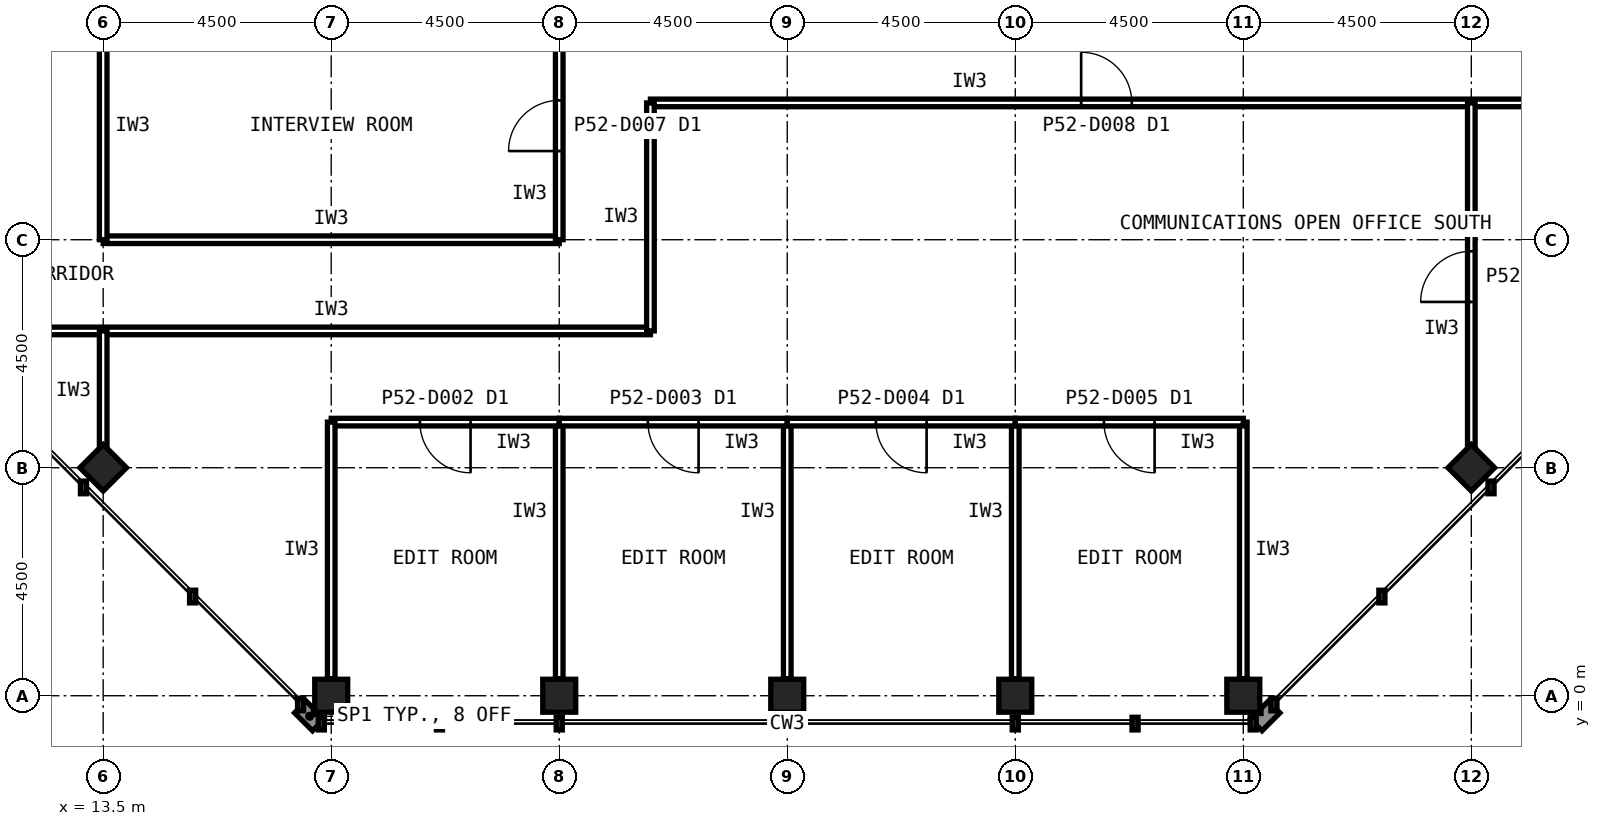
"""IFC4 building model, lengths in metres.
Left out: names, types, materials, properties, quantities, classifications, styles, units other than length and angle.
Written with IfcOpenShell. Run it as: python <this file> out.ifc"""

import sys

from ifc_helpers import new_model, si_unit, direction, frame, frame_2d, origin, origin_2d, place, context, subcontext, project, spatial, rectangle, hollow_rectangle, extrude, element, fill, save


model = new_model("IFC4")
c1 = context("Model", 3, precision=1e-05, world=origin(), true_north=direction((0.0, 1.0)))
c2 = subcontext(c1, "Body", "Model", "MODEL_VIEW")
j1 = project(units=[si_unit("LENGTHUNIT", "METRE"), si_unit("PLANEANGLEUNIT", "RADIAN")], contexts=[c1])
p1 = place(None, origin())
s1 = spatial("IfcSite", under=j1, at=p1, CompositionType="ELEMENT")
p2 = place(p1, origin())
s2 = spatial("IfcBuilding", under=s1, at=p2, CompositionType="ELEMENT")
p3 = place(p2, frame((0.0, 0.0, 222.6)))
s3 = spatial("IfcBuildingStorey", under=s2, at=p3, CompositionType="ELEMENT", Elevation=222.6)
for number, where, z_axis, x_axis in (
    (1, (18.0, 0.0, 0.0), (0.0, 0.0, 1.0), (1.0, 0.0, 0.0)),
    (2, (22.5, 0.0, 0.0), (0.0, 0.0, 1.0), (1.0, 0.0, 0.0)),
    (3, (27.0, 0.0, 0.0), (0.0, 0.0, 1.0), (1.0, 0.0, 0.0)),
    (4, (31.5, 0.0, 0.0), (0.0, 0.0, 1.0), (1.0, 0.0, 0.0)),
    (5, (36.0, 0.0, 0.0), (0.0, 0.0, 1.0), (1.0, 0.0, 0.0)),
    (6, (13.5, 4.5, 0.0), (0.0, 0.0, 1.0), (0.707, 0.707, 0.0)),
    (7, (40.5, 4.5, 0.0), (0.0, 0.0, 1.0), (0.707, 0.707, 0.0)),
):
    element("IfcColumn", number, at=place(p3, frame(where, z_axis=z_axis, x_axis=x_axis)), inside=s3, PredefinedType="COLUMN", context=c2, shape_type="SweptSolid", body=[
        extrude(hollow_rectangle(XDim=0.65, YDim=0.65, WallThickness=0.032, at=origin_2d()), origin(), (0.0, 0.0, 1.0), 4.0),
    ])
p4 = place(p3, frame((24.3, 11.7, 0.0), z_axis=(0.0, 0.0, 1.0), x_axis=(1.0, 0.0, 0.0)))
e8 = element("IfcWall", 8, at=p4, inside=s3, PredefinedType="PARTITIONING", context=c2, shape_type="SweptSolid", body=[
    extrude(rectangle(XDim=18.0, YDim=0.15, at=frame_2d((9.0, 0.0))), origin(), (0.0, 0.0, 1.0), 3.84),
])
p5 = place(p4, frame((8.5, 0.0, 0.0)))
e9 = element("IfcOpeningElement", 9, at=p5, cuts=e8, PredefinedType="OPENING", context=c2, shape_type="SweptSolid", body=[
    extrude(rectangle(XDim=1.0, YDim=2.1, at=frame_2d((0.5, 1.05))), frame((0.0, 0.085, 0.0), z_axis=(0.0, -1.0, 0.0), x_axis=(1.0, 0.0, 0.0)), (0.0, 0.0, 1.0), 0.17),
])
p6 = place(p3, frame((11.7, 7.2, 0.0), z_axis=(0.0, 0.0, 1.0), x_axis=(1.0, 0.0, 0.0)))
e10 = element("IfcWall", 10, at=p6, inside=s3, PredefinedType="PARTITIONING", context=c2, shape_type="SweptSolid", body=[
    extrude(rectangle(XDim=12.6, YDim=0.15, at=frame_2d((6.3, 0.0))), origin(), (0.0, 0.0, 1.0), 3.84),
])
p7 = place(p3, frame((24.3, 7.2, 0.0), z_axis=(0.0, 0.0, 1.0), x_axis=(0.0, 1.0, 0.0)))
e11 = element("IfcWall", 11, at=p7, inside=s3, PredefinedType="PARTITIONING", context=c2, shape_type="SweptSolid", body=[
    extrude(rectangle(XDim=4.5, YDim=0.15, at=frame_2d((2.25, 0.0))), origin(), (0.0, 0.0, 1.0), 3.84),
])
p8 = place(p3, frame((22.5, 0.335, 0.0), z_axis=(0.0, 0.0, 1.0), x_axis=(0.0, 1.0, 0.0)))
e12 = element("IfcWall", 12, at=p8, inside=s3, PredefinedType="PARTITIONING", context=c2, shape_type="SweptSolid", body=[
    extrude(rectangle(XDim=5.065, YDim=0.15, at=frame_2d((2.532, 0.0))), origin(), (0.0, 0.0, 1.0), 2.989),
])
p9 = place(p3, frame((22.5, 5.4, 0.0), z_axis=(0.0, 0.0, 1.0), x_axis=(-1.0, 0.0, 0.0)))
e13 = element("IfcWall", 13, at=p9, inside=s3, PredefinedType="PARTITIONING", context=c2, shape_type="SweptSolid", body=[
    extrude(rectangle(XDim=4.5, YDim=0.15, at=frame_2d((2.25, 0.0))), origin(), (0.0, 0.0, 1.0), 3.84),
])
p10 = place(p9, frame((1.75, 0.0, 0.0)))
e14 = element("IfcOpeningElement", 14, at=p10, cuts=e13, PredefinedType="OPENING", context=c2, shape_type="SweptSolid", body=[
    extrude(rectangle(XDim=1.0, YDim=2.1, at=frame_2d((0.5, 1.05))), frame((0.0, 0.085, 0.0), z_axis=(0.0, -1.0, 0.0), x_axis=(1.0, 0.0, 0.0)), (0.0, 0.0, 1.0), 0.17),
])
for number, where, z_axis, x_axis in (
    (15, (18.0, 5.4, 0.0), (0.0, 0.0, 1.0), (0.0, -1.0, 0.0)),
    (16, (27.0, 0.335, 0.0), (0.0, 0.0, 1.0), (0.0, 1.0, 0.0)),
):
    element("IfcWall", number, at=place(p3, frame(where, z_axis=z_axis, x_axis=x_axis)), inside=s3, PredefinedType="PARTITIONING", context=c2, shape_type="SweptSolid", body=[
        extrude(rectangle(XDim=5.065, YDim=0.15, at=frame_2d((2.532, 0.0))), origin(), (0.0, 0.0, 1.0), 2.989),
    ])
p11 = place(p3, frame((27.0, 5.4, 0.0), z_axis=(0.0, 0.0, 1.0), x_axis=(-1.0, 0.0, 0.0)))
e17 = element("IfcWall", 17, at=p11, inside=s3, PredefinedType="PARTITIONING", context=c2, shape_type="SweptSolid", body=[
    extrude(rectangle(XDim=4.5, YDim=0.15, at=frame_2d((2.25, 0.0))), origin(), (0.0, 0.0, 1.0), 3.84),
])
p12 = place(p11, frame((1.75, 0.0, 0.0)))
e18 = element("IfcOpeningElement", 18, at=p12, cuts=e17, PredefinedType="OPENING", context=c2, shape_type="SweptSolid", body=[
    extrude(rectangle(XDim=1.0, YDim=2.1, at=frame_2d((0.5, 1.05))), frame((0.0, 0.085, 0.0), z_axis=(0.0, -1.0, 0.0), x_axis=(1.0, 0.0, 0.0)), (0.0, 0.0, 1.0), 0.17),
])
p13 = place(p3, frame((31.5, 0.335, 0.0), z_axis=(0.0, 0.0, 1.0), x_axis=(0.0, 1.0, 0.0)))
e19 = element("IfcWall", 19, at=p13, inside=s3, PredefinedType="PARTITIONING", context=c2, shape_type="SweptSolid", body=[
    extrude(rectangle(XDim=5.065, YDim=0.15, at=frame_2d((2.532, 0.0))), origin(), (0.0, 0.0, 1.0), 2.989),
])
p14 = place(p3, frame((31.5, 5.4, 0.0), z_axis=(0.0, 0.0, 1.0), x_axis=(-1.0, 0.0, 0.0)))
e20 = element("IfcWall", 20, at=p14, inside=s3, PredefinedType="PARTITIONING", context=c2, shape_type="SweptSolid", body=[
    extrude(rectangle(XDim=4.5, YDim=0.15, at=frame_2d((2.25, 0.0))), origin(), (0.0, 0.0, 1.0), 3.84),
])
p15 = place(p14, frame((1.75, 0.0, 0.0)))
e21 = element("IfcOpeningElement", 21, at=p15, cuts=e20, PredefinedType="OPENING", context=c2, shape_type="SweptSolid", body=[
    extrude(rectangle(XDim=1.0, YDim=2.1, at=frame_2d((0.5, 1.05))), frame((0.0, 0.085, 0.0), z_axis=(0.0, -1.0, 0.0), x_axis=(1.0, 0.0, 0.0)), (0.0, 0.0, 1.0), 0.17),
])
p16 = place(p3, frame((36.0, 0.335, 0.0), z_axis=(0.0, 0.0, 1.0), x_axis=(0.0, 1.0, 0.0)))
e22 = element("IfcWall", 22, at=p16, inside=s3, PredefinedType="PARTITIONING", context=c2, shape_type="SweptSolid", body=[
    extrude(rectangle(XDim=5.065, YDim=0.15, at=frame_2d((2.532, 0.0))), origin(), (0.0, 0.0, 1.0), 2.989),
])
p17 = place(p3, frame((36.0, 5.4, 0.0), z_axis=(0.0, 0.0, 1.0), x_axis=(-1.0, 0.0, 0.0)))
e23 = element("IfcWall", 23, at=p17, inside=s3, PredefinedType="PARTITIONING", context=c2, shape_type="SweptSolid", body=[
    extrude(rectangle(XDim=4.5, YDim=0.15, at=frame_2d((2.25, 0.0))), origin(), (0.0, 0.0, 1.0), 3.84),
])
p18 = place(p17, frame((1.75, 0.0, 0.0)))
e24 = element("IfcOpeningElement", 24, at=p18, cuts=e23, PredefinedType="OPENING", context=c2, shape_type="SweptSolid", body=[
    extrude(rectangle(XDim=1.0, YDim=2.1, at=frame_2d((0.5, 1.05))), frame((0.0, 0.085, 0.0), z_axis=(0.0, -1.0, 0.0), x_axis=(1.0, 0.0, 0.0)), (0.0, 0.0, 1.0), 0.17),
])
p19 = place(p3, frame((13.5, 9.0, 0.0), z_axis=(0.0, 0.0, 1.0), x_axis=(1.0, 0.0, 0.0)))
e25 = element("IfcWall", 25, at=p19, inside=s3, PredefinedType="PARTITIONING", context=c2, shape_type="SweptSolid", body=[
    extrude(rectangle(XDim=9.0, YDim=0.15, at=frame_2d((4.5, 0.0))), origin(), (0.0, 0.0, 1.0), 3.84),
])
p20 = place(p3, frame((22.5, 9.0, 0.0), z_axis=(0.0, 0.0, 1.0), x_axis=(0.0, 1.0, 0.0)))
e26 = element("IfcWall", 26, at=p20, inside=s3, PredefinedType="PARTITIONING", context=c2, shape_type="SweptSolid", body=[
    extrude(rectangle(XDim=4.5, YDim=0.15, at=frame_2d((2.25, 0.0))), origin(), (0.0, 0.0, 1.0), 2.989),
])
p21 = place(p20, frame((1.75, 0.0, 0.0)))
e27 = element("IfcOpeningElement", 27, at=p21, cuts=e26, PredefinedType="OPENING", context=c2, shape_type="SweptSolid", body=[
    extrude(rectangle(XDim=1.0, YDim=2.1, at=frame_2d((0.5, 1.05))), frame((0.0, 0.085, 0.0), z_axis=(0.0, -1.0, 0.0), x_axis=(1.0, 0.0, 0.0)), (0.0, 0.0, 1.0), 0.17),
])
p22 = place(p3, frame((13.5, 13.5, 0.0), z_axis=(0.0, 0.0, 1.0), x_axis=(0.0, -1.0, 0.0)))
e28 = element("IfcWall", 28, at=p22, inside=s3, PredefinedType="PARTITIONING", context=c2, shape_type="SweptSolid", body=[
    extrude(rectangle(XDim=4.5, YDim=0.15, at=frame_2d((2.25, 0.0))), origin(), (0.0, 0.0, 1.0), 2.989),
])
p23 = place(p3, frame((40.5, 4.845, 0.0), z_axis=(0.0, 0.0, 1.0), x_axis=(0.0, 1.0, 0.0)))
e29 = element("IfcWall", 29, at=p23, inside=s3, PredefinedType="PARTITIONING", context=c2, shape_type="SweptSolid", body=[
    extrude(rectangle(XDim=6.855, YDim=0.15, at=frame_2d((3.427, 0.0))), origin(), (0.0, 0.0, 1.0), 2.989),
])
p24 = place(p23, frame((2.927, 0.0, 0.0)))
e30 = element("IfcOpeningElement", 30, at=p24, cuts=e29, PredefinedType="OPENING", context=c2, shape_type="SweptSolid", body=[
    extrude(rectangle(XDim=1.0, YDim=2.1, at=frame_2d((0.5, 1.05))), frame((0.0, 0.085, 0.0), z_axis=(0.0, -1.0, 0.0), x_axis=(1.0, 0.0, 0.0)), (0.0, 0.0, 1.0), 0.17),
])
p25 = place(p3, frame((13.5, 4.845, 0.0), z_axis=(0.0, 0.0, 1.0), x_axis=(0.0, 1.0, 0.0)))
e31 = element("IfcWall", 31, at=p25, inside=s3, PredefinedType="PARTITIONING", context=c2, shape_type="SweptSolid", body=[
    extrude(rectangle(XDim=2.355, YDim=0.15, at=frame_2d((1.177, 0.0))), origin(), (0.0, 0.0, 1.0), 2.989),
])
p26 = place(p5, origin())
e32 = element("IfcDoor", 32, at=p26, inside=s3, OperationType="SINGLE_SWING_LEFT", PredefinedType="DOOR", context=c2, shape_type="SweptSolid", body=[
    extrude(rectangle(XDim=1.0, YDim=2.1, at=frame_2d((0.5, 1.05))), frame((0.0, 0.025, 0.0), z_axis=(0.0, -1.0, 0.0), x_axis=(1.0, 0.0, 0.0)), (0.0, 0.0, 1.0), 0.05),
])
fill(e9, e32)
p27 = place(p10, origin())
e33 = element("IfcDoor", 33, at=p27, inside=s3, OperationType="SINGLE_SWING_LEFT", PredefinedType="DOOR", context=c2, shape_type="SweptSolid", body=[
    extrude(rectangle(XDim=1.0, YDim=2.1, at=frame_2d((0.5, 1.05))), frame((0.0, 0.025, 0.0), z_axis=(0.0, -1.0, 0.0), x_axis=(1.0, 0.0, 0.0)), (0.0, 0.0, 1.0), 0.05),
])
fill(e14, e33)
p28 = place(p12, origin())
e34 = element("IfcDoor", 34, at=p28, inside=s3, OperationType="SINGLE_SWING_LEFT", PredefinedType="DOOR", context=c2, shape_type="SweptSolid", body=[
    extrude(rectangle(XDim=1.0, YDim=2.1, at=frame_2d((0.5, 1.05))), frame((0.0, 0.025, 0.0), z_axis=(0.0, -1.0, 0.0), x_axis=(1.0, 0.0, 0.0)), (0.0, 0.0, 1.0), 0.05),
])
fill(e18, e34)
p29 = place(p15, origin())
e35 = element("IfcDoor", 35, at=p29, inside=s3, OperationType="SINGLE_SWING_LEFT", PredefinedType="DOOR", context=c2, shape_type="SweptSolid", body=[
    extrude(rectangle(XDim=1.0, YDim=2.1, at=frame_2d((0.5, 1.05))), frame((0.0, 0.025, 0.0), z_axis=(0.0, -1.0, 0.0), x_axis=(1.0, 0.0, 0.0)), (0.0, 0.0, 1.0), 0.05),
])
fill(e21, e35)
p30 = place(p18, origin())
e36 = element("IfcDoor", 36, at=p30, inside=s3, OperationType="SINGLE_SWING_LEFT", PredefinedType="DOOR", context=c2, shape_type="SweptSolid", body=[
    extrude(rectangle(XDim=1.0, YDim=2.1, at=frame_2d((0.5, 1.05))), frame((0.0, 0.025, 0.0), z_axis=(0.0, -1.0, 0.0), x_axis=(1.0, 0.0, 0.0)), (0.0, 0.0, 1.0), 0.05),
])
fill(e24, e36)
p31 = place(p21, origin())
e37 = element("IfcDoor", 37, at=p31, inside=s3, OperationType="SINGLE_SWING_LEFT", PredefinedType="DOOR", context=c2, shape_type="SweptSolid", body=[
    extrude(rectangle(XDim=1.0, YDim=2.1, at=frame_2d((0.5, 1.05))), frame((0.0, 0.025, 0.0), z_axis=(0.0, -1.0, 0.0), x_axis=(1.0, 0.0, 0.0)), (0.0, 0.0, 1.0), 0.05),
])
fill(e27, e37)
p32 = place(p24, origin())
e38 = element("IfcDoor", 38, at=p32, inside=s3, OperationType="SINGLE_SWING_LEFT", PredefinedType="DOOR", context=c2, shape_type="SweptSolid", body=[
    extrude(rectangle(XDim=1.0, YDim=2.1, at=frame_2d((0.5, 1.05))), frame((0.0, 0.025, 0.0), z_axis=(0.0, -1.0, 0.0), x_axis=(1.0, 0.0, 0.0)), (0.0, 0.0, 1.0), 0.05),
])
fill(e30, e38)
save(model, sys.argv[1])
